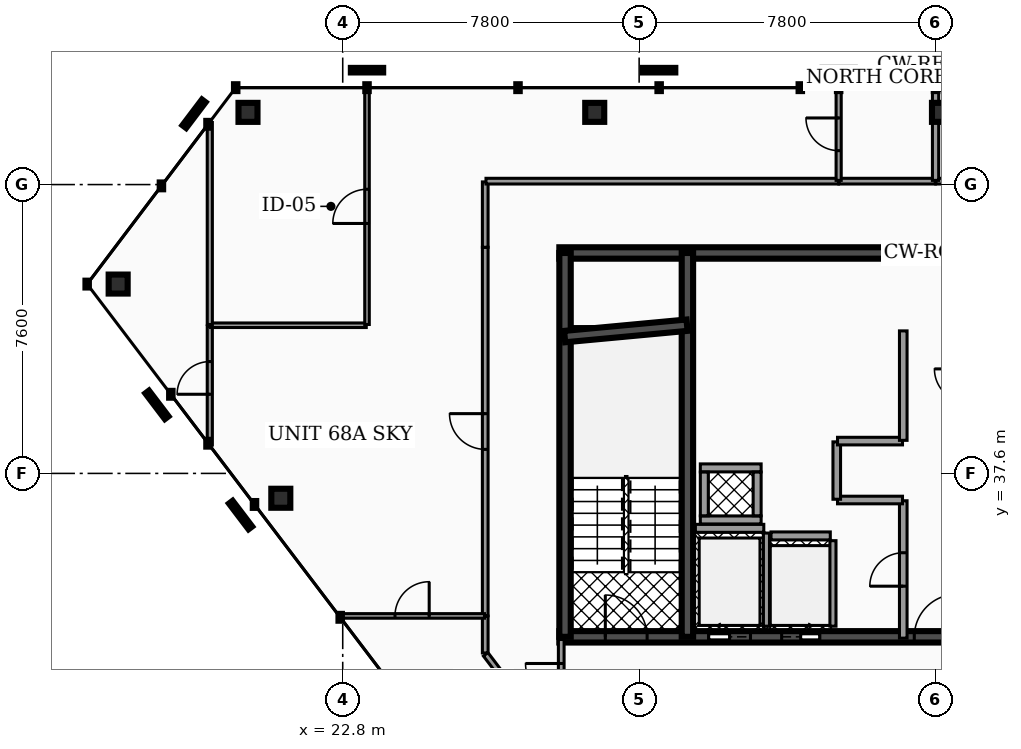
"""IFC4 building model, lengths in metres.
Left out: names, types, materials, properties, quantities, classifications, styles, units other than length and angle.
Written with IfcOpenShell. Run it as: python <this file> out.ifc"""

import sys

from ifc_helpers import new_model, si_unit, direction, frame, frame_2d, origin, origin_2d, place, context, subcontext, project, spatial, rectangle, hollow_rectangle, extrude, element, fill, save


model = new_model("IFC4")
c1 = context("Model", 3, precision=1e-05, world=origin(), true_north=direction((0.0, 1.0)))
c2 = subcontext(c1, "Body", "Model", "MODEL_VIEW")
j1 = project(units=[si_unit("LENGTHUNIT", "METRE"), si_unit("PLANEANGLEUNIT", "RADIAN")], contexts=[c1])
p1 = place(None, origin())
s1 = spatial("IfcSite", under=j1, at=p1, CompositionType="ELEMENT")
p2 = place(p1, origin())
s2 = spatial("IfcBuilding", under=s1, at=p2, CompositionType="ELEMENT")
p3 = place(p2, frame((0.0, 0.0, 268.6)))
s3 = spatial("IfcBuildingStorey", under=s2, at=p3, CompositionType="ELEMENT", Elevation=268.6)
p4 = place(p3, frame((28.5, 43.4, 0.0), z_axis=(0.0, 0.0, 1.0), x_axis=(1.0, 0.0, 0.0)))
e1 = element("IfcWall", 1, at=p4, inside=s3, PredefinedType="SHEAR", context=c2, shape_type="SweptSolid", body=[
    extrude(rectangle(XDim=19.86, YDim=0.3, at=frame_2d((9.93, 0.0))), origin(), (0.0, 0.0, 1.0), 3.18),
])
p5 = place(p3, frame((28.5, 33.3, 0.0), z_axis=(0.0, 0.0, 1.0), x_axis=(1.0, 0.0, 0.0)))
e2 = element("IfcWall", 2, at=p5, inside=s3, PredefinedType="SHEAR", context=c2, shape_type="SweptSolid", body=[
    extrude(rectangle(XDim=19.86, YDim=0.3, at=frame_2d((9.93, 0.0))), origin(), (0.0, 0.0, 1.0), 3.18),
])
p6 = place(p5, frame((3.93, 0.0, 0.0)))
e3 = element("IfcOpeningElement", 3, at=p6, cuts=e2, PredefinedType="OPENING", context=c2, shape_type="SweptSolid", body=[
    extrude(rectangle(XDim=1.1, YDim=2.15, at=frame_2d((0.55, 1.075))), frame((0.0, 0.16, 0.0), z_axis=(0.0, -1.0, 0.0), x_axis=(1.0, 0.0, 0.0)), (0.0, 0.0, 1.0), 0.32),
])
p7 = place(p5, frame((14.77, 0.0, 0.0)))
e4 = element("IfcOpeningElement", 4, at=p7, cuts=e2, PredefinedType="OPENING", context=c2, shape_type="SweptSolid", body=[
    extrude(rectangle(XDim=1.1, YDim=2.15, at=frame_2d((0.55, 1.075))), frame((0.0, 0.16, 0.0), z_axis=(0.0, -1.0, 0.0), x_axis=(1.0, 0.0, 0.0)), (0.0, 0.0, 1.0), 0.32),
])
p8 = place(p5, frame((11.25, 0.0, 0.0)))
e5 = element("IfcOpeningElement", 5, at=p8, cuts=e2, PredefinedType="OPENING", context=c2, shape_type="SweptSolid", body=[
    extrude(rectangle(XDim=1.0, YDim=2.1, at=frame_2d((0.5, 1.05))), frame((0.0, 0.16, 0.0), z_axis=(0.0, -1.0, 0.0), x_axis=(1.0, 0.0, 0.0)), (0.0, 0.0, 1.0), 0.32),
])
p9 = place(p5, frame((12.95, 0.0, 0.0)))
e6 = element("IfcOpeningElement", 6, at=p9, cuts=e2, PredefinedType="OPENING", context=c2, shape_type="SweptSolid", body=[
    extrude(rectangle(XDim=1.0, YDim=2.1, at=frame_2d((0.5, 1.05))), frame((0.0, 0.16, 0.0), z_axis=(0.0, -1.0, 0.0), x_axis=(1.0, 0.0, 0.0)), (0.0, 0.0, 1.0), 0.32),
])
p10 = place(p5, frame((5.85, 0.0, 0.0)))
e7 = element("IfcOpeningElement", 7, at=p10, cuts=e2, PredefinedType="OPENING", context=c2, shape_type="SweptSolid", body=[
    extrude(rectangle(XDim=1.0, YDim=2.1, at=frame_2d((0.5, 1.05))), frame((0.0, 0.16, 0.0), z_axis=(0.0, -1.0, 0.0), x_axis=(1.0, 0.0, 0.0)), (0.0, 0.0, 1.0), 0.32),
])
p11 = place(p5, frame((1.21, 0.0, 0.0)))
e8 = element("IfcOpeningElement", 8, at=p11, cuts=e2, PredefinedType="OPENING", context=c2, shape_type="SweptSolid", body=[
    extrude(rectangle(XDim=1.1, YDim=2.2, at=frame_2d((0.55, 1.1))), frame((0.0, 0.16, 0.0), z_axis=(0.0, -1.0, 0.0), x_axis=(1.0, 0.0, 0.0)), (0.0, 0.0, 1.0), 0.32),
])
p12 = place(p5, frame((9.34, 0.0, 0.0)))
e9 = element("IfcOpeningElement", 9, at=p12, cuts=e2, PredefinedType="OPENING", context=c2, shape_type="SweptSolid", body=[
    extrude(rectangle(XDim=1.12, YDim=2.05, at=frame_2d((0.56, 1.025))), frame((0.0, 0.16, 0.0), z_axis=(0.0, -1.0, 0.0), x_axis=(1.0, 0.0, 0.0)), (0.0, 0.0, 1.0), 0.32),
])
p13 = place(p5, frame((17.55, 0.0, 0.0)))
e10 = element("IfcOpeningElement", 10, at=p13, cuts=e2, PredefinedType="OPENING", context=c2, shape_type="SweptSolid", body=[
    extrude(rectangle(XDim=1.1, YDim=2.2, at=frame_2d((0.55, 1.1))), frame((0.0, 0.16, 0.0), z_axis=(0.0, -1.0, 0.0), x_axis=(1.0, 0.0, 0.0)), (0.0, 0.0, 1.0), 0.32),
])
for number, where, z_axis, x_axis in (
    (11, (28.65, 33.3, 0.0), (0.0, 0.0, 1.0), (0.0, 1.0, 0.0)),
    (12, (31.87, 33.3, 0.0), (0.0, 0.0, 1.0), (0.0, 1.0, 0.0)),
):
    element("IfcWall", number, at=place(p3, frame(where, z_axis=z_axis, x_axis=x_axis)), inside=s3, PredefinedType="SHEAR", context=c2, shape_type="SweptSolid", body=[
        extrude(rectangle(XDim=10.1, YDim=0.3, at=frame_2d((5.05, 0.0))), origin(), (0.0, 0.0, 1.0), 3.18),
    ])
p14 = place(p3, frame((28.64, 41.2, 0.0), z_axis=(0.0, 0.0, 1.0), x_axis=(0.995687118776, 0.092774789157, 0.0)))
e13 = element("IfcWall", 13, at=p14, inside=s3, PredefinedType="SHEAR", context=c2, shape_type="SweptSolid", body=[
    extrude(rectangle(XDim=3.234, YDim=0.3, at=frame_2d((1.617, 0.0))), origin(), (0.0, 0.0, 1.0), 3.18),
])
for number, where, z_axis, x_axis in (
    (14, (38.555, 47.1, 0.0), (0.0, 0.0, 1.0), (1.0, 0.0, 0.0)),
    (15, (29.431, 47.1, 0.0), (0.0, 0.0, 1.0), (1.0, 0.0, 0.0)),
    (16, (20.307, 47.1, 0.0), (0.0, 0.0, 1.0), (1.0, 0.0, 0.0)),
    (17, (16.891, 42.582, 0.0), (0.0, 0.0, 1.0), (1.0, 0.0, 0.0)),
    (18, (21.171, 36.946, 0.0), (0.0, 0.0, 1.0), (1.0, 0.0, 0.0)),
):
    element("IfcColumn", number, at=place(p3, frame(where, z_axis=z_axis, x_axis=x_axis)), inside=s3, PredefinedType="COLUMN", context=c2, shape_type="SweptSolid", body=[
        extrude(hollow_rectangle(XDim=0.5, YDim=0.5, WallThickness=0.025, at=origin_2d()), origin(), (0.0, 0.0, 1.0), 3.18),
    ])
p15 = place(p3, frame((32.08, 36.155, 0.0), z_axis=(0.0, 0.0, 1.0), x_axis=(1.0, 0.0, 0.0)))
e19 = element("IfcWall", 19, at=p15, inside=s3, PredefinedType="SOLIDWALL", context=c2, shape_type="SweptSolid", body=[
    extrude(rectangle(XDim=1.8, YDim=0.21, at=frame_2d((0.9, 0.0))), origin(), (0.0, 0.0, 1.0), 3.18),
])
p16 = place(p3, frame((33.95, 33.58, 0.0), z_axis=(0.0, 0.0, 1.0), x_axis=(0.0, 1.0, 0.0)))
e20 = element("IfcWall", 20, at=p16, inside=s3, PredefinedType="SOLIDWALL", context=c2, shape_type="SweptSolid", body=[
    extrude(rectangle(XDim=2.45, YDim=0.16, at=frame_2d((1.225, 0.0))), origin(), (0.0, 0.0, 1.0), 3.18),
])
p17 = place(p3, frame((34.07, 35.955, 0.0), z_axis=(0.0, 0.0, 1.0), x_axis=(1.0, 0.0, 0.0)))
e21 = element("IfcWall", 21, at=p17, inside=s3, PredefinedType="SOLIDWALL", context=c2, shape_type="SweptSolid", body=[
    extrude(rectangle(XDim=1.56, YDim=0.21, at=frame_2d((0.78, 0.0))), origin(), (0.0, 0.0, 1.0), 3.18),
])
p18 = place(p3, frame((35.7, 33.58, 0.0), z_axis=(0.0, 0.0, 1.0), x_axis=(0.0, 1.0, 0.0)))
e22 = element("IfcWall", 22, at=p18, inside=s3, PredefinedType="SOLIDWALL", context=c2, shape_type="SweptSolid", body=[
    extrude(rectangle(XDim=2.25, YDim=0.16, at=frame_2d((1.125, 0.0))), origin(), (0.0, 0.0, 1.0), 3.18),
])
for number, where, z_axis, x_axis in (
    (23, (32.21, 36.375, 0.0), (0.0, 0.0, 1.0), (1.0, 0.0, 0.0)),
    (24, (32.21, 37.745, 0.0), (0.0, 0.0, 1.0), (1.0, 0.0, 0.0)),
):
    element("IfcWall", number, at=place(p3, frame(where, z_axis=z_axis, x_axis=x_axis)), inside=s3, PredefinedType="SOLIDWALL", context=c2, shape_type="SweptSolid", body=[
        extrude(rectangle(XDim=1.6, YDim=0.21, at=frame_2d((0.8, 0.0))), origin(), (0.0, 0.0, 1.0), 3.18),
    ])
for number, where, z_axis, x_axis in (
    (25, (32.315, 36.485, 0.0), (0.0, 0.0, 1.0), (0.0, 1.0, 0.0)),
    (26, (33.705, 36.485, 0.0), (0.0, 0.0, 1.0), (0.0, 1.0, 0.0)),
):
    element("IfcWall", number, at=place(p3, frame(where, z_axis=z_axis, x_axis=x_axis)), inside=s3, PredefinedType="SOLIDWALL", context=c2, shape_type="SweptSolid", body=[
        extrude(rectangle(XDim=1.15, YDim=0.21, at=frame_2d((0.575, 0.0))), origin(), (0.0, 0.0, 1.0), 3.18),
    ])
p19 = place(p3, frame((37.55, 33.265, 0.0), z_axis=(0.0, 0.0, 1.0), x_axis=(0.0, 1.0, 0.0)))
e27 = element("IfcWall", 27, at=p19, inside=s3, PredefinedType="PARTITIONING", context=c2, shape_type="SweptSolid", body=[
    extrude(rectangle(XDim=3.615, YDim=0.2, at=frame_2d((1.808, 0.0))), origin(), (0.0, 0.0, 1.0), 2.235),
])
p20 = place(p19, frame((1.367, 0.0, 0.0)))
e28 = element("IfcOpeningElement", 28, at=p20, cuts=e27, PredefinedType="OPENING", context=c2, shape_type="SweptSolid", body=[
    extrude(rectangle(XDim=0.88, YDim=2.05, at=frame_2d((0.44, 1.025))), frame((0.0, 0.11, 0.0), z_axis=(0.0, -1.0, 0.0), x_axis=(1.0, 0.0, 0.0)), (0.0, 0.0, 1.0), 0.22),
])
p21 = place(p3, frame((35.82, 36.9, 0.0), z_axis=(0.0, 0.0, 1.0), x_axis=(1.0, 0.0, 0.0)))
e29 = element("IfcWall", 29, at=p21, inside=s3, PredefinedType="PARTITIONING", context=c2, shape_type="SweptSolid", body=[
    extrude(rectangle(XDim=1.71, YDim=0.2, at=frame_2d((0.855, 0.0))), origin(), (0.0, 0.0, 1.0), 2.235),
])
p22 = place(p3, frame((35.8, 36.92, 0.0), z_axis=(0.0, 0.0, 1.0), x_axis=(0.0, 1.0, 0.0)))
e30 = element("IfcWall", 30, at=p22, inside=s3, PredefinedType="PARTITIONING", context=c2, shape_type="SweptSolid", body=[
    extrude(rectangle(XDim=1.51, YDim=0.2, at=frame_2d((0.755, 0.0))), origin(), (0.0, 0.0, 1.0), 2.235),
])
p23 = place(p3, frame((35.82, 38.45, 0.0), z_axis=(0.0, 0.0, 1.0), x_axis=(1.0, 0.0, 0.0)))
e31 = element("IfcWall", 31, at=p23, inside=s3, PredefinedType="PARTITIONING", context=c2, shape_type="SweptSolid", body=[
    extrude(rectangle(XDim=1.71, YDim=0.2, at=frame_2d((0.855, 0.0))), origin(), (0.0, 0.0, 1.0), 2.235),
])
p24 = place(p3, frame((37.55, 38.47, 0.0), z_axis=(0.0, 0.0, 1.0), x_axis=(0.0, 1.0, 0.0)))
e32 = element("IfcWall", 32, at=p24, inside=s3, PredefinedType="PARTITIONING", context=c2, shape_type="SweptSolid", body=[
    extrude(rectangle(XDim=2.88, YDim=0.2, at=frame_2d((1.44, 0.0))), origin(), (0.0, 0.0, 1.0), 2.235),
])
p25 = place(p3, frame((28.55, 30.227, 0.0), z_axis=(0.0, 0.0, 1.0), x_axis=(0.0, 1.0, 0.0)))
e33 = element("IfcWall", 33, at=p25, inside=s3, PredefinedType="PARTITIONING", context=c2, shape_type="SweptSolid", body=[
    extrude(rectangle(XDim=3.003, YDim=0.15, at=frame_2d((1.501, 0.0))), origin(), (0.0, 0.0, 1.0), 2.235),
])
p26 = place(p25, frame((1.431, 0.0, 0.0)))
e34 = element("IfcOpeningElement", 34, at=p26, cuts=e33, PredefinedType="OPENING", context=c2, shape_type="SweptSolid", body=[
    extrude(rectangle(XDim=0.94, YDim=2.05, at=frame_2d((0.47, 1.025))), frame((0.0, 0.085, 0.0), z_axis=(0.0, -1.0, 0.0), x_axis=(1.0, 0.0, 0.0)), (0.0, 0.0, 1.0), 0.17),
])
p27 = place(p3, frame((26.55, 33.855, 0.0), z_axis=(0.0, 0.0, 1.0), x_axis=(0.0, 1.0, 0.0)))
e35 = element("IfcWall", 35, at=p27, inside=s3, PredefinedType="PARTITIONING", context=c2, shape_type="SweptSolid", body=[
    extrude(rectangle(XDim=9.695, YDim=0.15, at=frame_2d((4.847, 0.0))), origin(), (0.0, 0.0, 1.0), 2.235),
])
p28 = place(p27, frame((4.377, 0.0, 0.0)))
e36 = element("IfcOpeningElement", 36, at=p28, cuts=e35, PredefinedType="OPENING", context=c2, shape_type="SweptSolid", body=[
    extrude(rectangle(XDim=0.94, YDim=2.05, at=frame_2d((0.47, 1.025))), frame((0.0, 0.085, 0.0), z_axis=(0.0, -1.0, 0.0), x_axis=(1.0, 0.0, 0.0)), (0.0, 0.0, 1.0), 0.17),
])
p29 = place(p3, frame((26.55, 43.55, 0.0), z_axis=(0.0, 0.0, 1.0), x_axis=(0.0, 1.0, 0.0)))
e37 = element("IfcWall", 37, at=p29, inside=s3, PredefinedType="PARTITIONING", context=c2, shape_type="SweptSolid", body=[
    extrude(rectangle(XDim=1.72, YDim=0.15, at=frame_2d((0.86, 0.0))), origin(), (0.0, 0.0, 1.0), 2.235),
])
p30 = place(p3, frame((26.57, 45.29, 0.0), z_axis=(0.0, 0.0, 1.0), x_axis=(1.0, 0.0, 0.0)))
e38 = element("IfcWall", 38, at=p30, inside=s3, PredefinedType="PARTITIONING", context=c2, shape_type="SweptSolid", body=[
    extrude(rectangle(XDim=9.275, YDim=0.15, at=frame_2d((4.637, 0.0))), origin(), (0.0, 0.0, 1.0), 2.235),
])
p31 = place(p3, frame((35.855, 45.29, 0.0), z_axis=(0.0, 0.0, 1.0), x_axis=(1.0, 0.0, 0.0)))
e39 = element("IfcWall", 39, at=p31, inside=s3, PredefinedType="PARTITIONING", context=c2, shape_type="SweptSolid", body=[
    extrude(rectangle(XDim=2.54, YDim=0.15, at=frame_2d((1.27, 0.0))), origin(), (0.0, 0.0, 1.0), 2.235),
])
p32 = place(p3, frame((26.562, 32.84, 0.0), z_axis=(0.0, 0.0, 1.0), x_axis=(0.604783852999, -0.796389660375, 0.0)))
e40 = element("IfcWall", 40, at=p32, inside=s3, PredefinedType="PARTITIONING", context=c2, shape_type="SweptSolid", body=[
    extrude(rectangle(XDim=3.267, YDim=0.15, at=frame_2d((1.634, 0.0))), origin(), (0.0, 0.0, 1.0), 2.235),
])
p33 = place(p3, frame((26.55, 32.875, 0.0), z_axis=(0.0, 0.0, 1.0), x_axis=(0.0, 1.0, 0.0)))
e41 = element("IfcWall", 41, at=p33, inside=s3, PredefinedType="PARTITIONING", context=c2, shape_type="SweptSolid", body=[
    extrude(rectangle(XDim=0.97, YDim=0.15, at=frame_2d((0.485, 0.0))), origin(), (0.0, 0.0, 1.0), 2.235),
])
p34 = place(p3, frame((38.405, 45.29, 0.0), z_axis=(0.0, 0.0, 1.0), x_axis=(1.0, 0.0, 0.0)))
e42 = element("IfcWall", 42, at=p34, inside=s3, PredefinedType="PARTITIONING", context=c2, shape_type="SweptSolid", body=[
    extrude(rectangle(XDim=2.54, YDim=0.15, at=frame_2d((1.27, 0.0))), origin(), (0.0, 0.0, 1.0), 2.235),
])
p35 = place(p3, frame((19.302, 38.347, 0.0), z_axis=(0.0, 0.0, 1.0), x_axis=(0.0, 1.0, 0.0)))
e43 = element("IfcWall", 43, at=p35, inside=s3, PredefinedType="PARTITIONING", context=c2, shape_type="SweptSolid", body=[
    extrude(rectangle(XDim=3.132, YDim=0.135, at=frame_2d((1.566, 0.0))), origin(), (0.0, 0.0, 1.0), 2.235),
])
p36 = place(p35, frame((1.336, 0.0, 0.0)))
e44 = element("IfcOpeningElement", 44, at=p36, cuts=e43, PredefinedType="OPENING", context=c2, shape_type="SweptSolid", body=[
    extrude(rectangle(XDim=0.86, YDim=2.05, at=frame_2d((0.43, 1.025))), frame((0.0, 0.077, 0.0), z_axis=(0.0, -1.0, 0.0), x_axis=(1.0, 0.0, 0.0)), (0.0, 0.0, 1.0), 0.155),
])
p37 = place(p3, frame((35.85, 45.31, 0.0), z_axis=(0.0, 0.0, 1.0), x_axis=(0.0, 1.0, 0.0)))
e45 = element("IfcWall", 45, at=p37, inside=s3, PredefinedType="PARTITIONING", context=c2, shape_type="SweptSolid", body=[
    extrude(rectangle(XDim=2.425, YDim=0.135, at=frame_2d((1.212, 0.0))), origin(), (0.0, 0.0, 1.0), 2.235),
])
p38 = place(p37, frame((0.782, 0.0, 0.0)))
e46 = element("IfcOpeningElement", 46, at=p38, cuts=e45, PredefinedType="OPENING", context=c2, shape_type="SweptSolid", body=[
    extrude(rectangle(XDim=0.86, YDim=2.05, at=frame_2d((0.43, 1.025))), frame((0.0, 0.077, 0.0), z_axis=(0.0, -1.0, 0.0), x_axis=(1.0, 0.0, 0.0)), (0.0, 0.0, 1.0), 0.155),
])
p39 = place(p3, frame((19.322, 41.499, 0.0), z_axis=(0.0, 0.0, 1.0), x_axis=(1.0, 0.0, 0.0)))
e47 = element("IfcWall", 47, at=p39, inside=s3, PredefinedType="PARTITIONING", context=c2, shape_type="SweptSolid", body=[
    extrude(rectangle(XDim=4.097, YDim=0.12, at=frame_2d((2.048, 0.0))), origin(), (0.0, 0.0, 1.0), 2.235),
])
p40 = place(p3, frame((23.439, 41.519, 0.0), z_axis=(0.0, 0.0, 1.0), x_axis=(0.0, 1.0, 0.0)))
e48 = element("IfcWall", 48, at=p40, inside=s3, PredefinedType="PARTITIONING", context=c2, shape_type="SweptSolid", body=[
    extrude(rectangle(XDim=6.217, YDim=0.12, at=frame_2d((3.108, 0.0))), origin(), (0.0, 0.0, 1.0), 2.235),
])
p41 = place(p40, frame((2.658, 0.0, 0.0)))
e49 = element("IfcOpeningElement", 49, at=p41, cuts=e48, PredefinedType="OPENING", context=c2, shape_type="SweptSolid", body=[
    extrude(rectangle(XDim=0.9, YDim=2.05, at=frame_2d((0.45, 1.025))), frame((0.0, 0.07, 0.0), z_axis=(0.0, -1.0, 0.0), x_axis=(1.0, 0.0, 0.0)), (0.0, 0.0, 1.0), 0.14),
])
p42 = place(p3, frame((22.721, 33.85, 0.0), z_axis=(0.0, 0.0, 1.0), x_axis=(1.0, 0.0, 0.0)))
e50 = element("IfcWall", 50, at=p42, inside=s3, PredefinedType="PARTITIONING", context=c2, shape_type="SweptSolid", body=[
    extrude(rectangle(XDim=3.809, YDim=0.12, at=frame_2d((1.905, 0.0))), origin(), (0.0, 0.0, 1.0), 2.235),
])
p43 = place(p42, frame((1.455, 0.0, 0.0)))
e51 = element("IfcOpeningElement", 51, at=p43, cuts=e50, PredefinedType="OPENING", context=c2, shape_type="SweptSolid", body=[
    extrude(rectangle(XDim=0.9, YDim=2.05, at=frame_2d((0.45, 1.025))), frame((0.0, 0.07, 0.0), z_axis=(0.0, -1.0, 0.0), x_axis=(1.0, 0.0, 0.0)), (0.0, 0.0, 1.0), 0.14),
])
p44 = place(p3, frame((19.302, 41.519, 0.0), z_axis=(0.0, 0.0, 1.0), x_axis=(0.0, 1.0, 0.0)))
e52 = element("IfcWall", 52, at=p44, inside=s3, PredefinedType="PARTITIONING", context=c2, shape_type="SweptSolid", body=[
    extrude(rectangle(XDim=5.315, YDim=0.135, at=frame_2d((2.658, 0.0))), origin(), (0.0, 0.0, 1.0), 2.235),
])
p45 = place(p3, frame((38.4, 45.31, 0.0), z_axis=(0.0, 0.0, 1.0), x_axis=(0.0, 1.0, 0.0)))
e53 = element("IfcWall", 53, at=p45, inside=s3, PredefinedType="PARTITIONING", context=c2, shape_type="SweptSolid", body=[
    extrude(rectangle(XDim=2.425, YDim=0.165, at=frame_2d((1.212, 0.0))), origin(), (0.0, 0.0, 1.0), 2.235),
])
p46 = place(p6, origin())
e54 = element("IfcDoor", 54, at=p46, inside=s3, OperationType="SLIDING_TO_LEFT", PredefinedType="DOOR", context=c2, shape_type="SweptSolid", body=[
    extrude(rectangle(XDim=1.1, YDim=2.15, at=frame_2d((0.55, 1.075))), frame((0.0, 0.025, 0.0), z_axis=(0.0, -1.0, 0.0), x_axis=(1.0, 0.0, 0.0)), (0.0, 0.0, 1.0), 0.05),
])
fill(e3, e54)
p47 = place(p10, origin())
e55 = element("IfcDoor", 55, at=p47, inside=s3, OperationType="SLIDING_TO_RIGHT", PredefinedType="DOOR", context=c2, shape_type="SweptSolid", body=[
    extrude(rectangle(XDim=1.0, YDim=2.1, at=frame_2d((0.5, 1.05))), frame((0.0, 0.025, 0.0), z_axis=(0.0, -1.0, 0.0), x_axis=(1.0, 0.0, 0.0)), (0.0, 0.0, 1.0), 0.05),
])
fill(e7, e55)
p48 = place(p11, origin())
e56 = element("IfcDoor", 56, at=p48, inside=s3, OperationType="SINGLE_SWING_LEFT", PredefinedType="DOOR", context=c2, shape_type="SweptSolid", body=[
    extrude(rectangle(XDim=1.1, YDim=2.2, at=frame_2d((0.55, 1.1))), frame((0.0, 0.025, 0.0), z_axis=(0.0, -1.0, 0.0), x_axis=(1.0, 0.0, 0.0)), (0.0, 0.0, 1.0), 0.05),
])
fill(e8, e56)
p49 = place(p12, origin())
e57 = element("IfcDoor", 57, at=p49, inside=s3, OperationType="SINGLE_SWING_RIGHT", PredefinedType="DOOR", context=c2, shape_type="SweptSolid", body=[
    extrude(rectangle(XDim=1.12, YDim=2.05, at=frame_2d((0.56, 1.025))), frame((0.0, 0.025, 0.0), z_axis=(0.0, -1.0, 0.0), x_axis=(1.0, 0.0, 0.0)), (0.0, 0.0, 1.0), 0.05),
])
fill(e9, e57)
p50 = place(p20, origin())
e58 = element("IfcDoor", 58, at=p50, inside=s3, OperationType="SINGLE_SWING_LEFT", PredefinedType="DOOR", context=c2, shape_type="SweptSolid", body=[
    extrude(rectangle(XDim=0.88, YDim=2.05, at=frame_2d((0.44, 1.025))), frame((0.0, 0.025, 0.0), z_axis=(0.0, -1.0, 0.0), x_axis=(1.0, 0.0, 0.0)), (0.0, 0.0, 1.0), 0.05),
])
fill(e28, e58)
p51 = place(p26, origin())
e59 = element("IfcDoor", 59, at=p51, inside=s3, OperationType="SINGLE_SWING_RIGHT", PredefinedType="DOOR", context=c2, shape_type="SweptSolid", body=[
    extrude(rectangle(XDim=0.94, YDim=2.05, at=frame_2d((0.47, 1.025))), frame((0.0, 0.025, 0.0), z_axis=(0.0, -1.0, 0.0), x_axis=(1.0, 0.0, 0.0)), (0.0, 0.0, 1.0), 0.05),
])
fill(e34, e59)
p52 = place(p28, origin())
e60 = element("IfcDoor", 60, at=p52, inside=s3, OperationType="SINGLE_SWING_RIGHT", PredefinedType="DOOR", context=c2, shape_type="SweptSolid", body=[
    extrude(rectangle(XDim=0.94, YDim=2.05, at=frame_2d((0.47, 1.025))), frame((0.0, 0.025, 0.0), z_axis=(0.0, -1.0, 0.0), x_axis=(1.0, 0.0, 0.0)), (0.0, 0.0, 1.0), 0.05),
])
fill(e36, e60)
p53 = place(p36, origin())
e61 = element("IfcDoor", 61, at=p53, inside=s3, OperationType="SINGLE_SWING_LEFT", PredefinedType="DOOR", context=c2, shape_type="SweptSolid", body=[
    extrude(rectangle(XDim=0.86, YDim=2.05, at=frame_2d((0.43, 1.025))), frame((0.0, 0.025, 0.0), z_axis=(0.0, -1.0, 0.0), x_axis=(1.0, 0.0, 0.0)), (0.0, 0.0, 1.0), 0.05),
])
fill(e44, e61)
p54 = place(p38, origin())
e62 = element("IfcDoor", 62, at=p54, inside=s3, OperationType="SINGLE_SWING_RIGHT", PredefinedType="DOOR", context=c2, shape_type="SweptSolid", body=[
    extrude(rectangle(XDim=0.86, YDim=2.05, at=frame_2d((0.43, 1.025))), frame((0.0, 0.025, 0.0), z_axis=(0.0, -1.0, 0.0), x_axis=(1.0, 0.0, 0.0)), (0.0, 0.0, 1.0), 0.05),
])
fill(e46, e62)
p55 = place(p41, origin())
e63 = element("IfcDoor", 63, at=p55, inside=s3, OperationType="SINGLE_SWING_LEFT", PredefinedType="DOOR", context=c2, shape_type="SweptSolid", body=[
    extrude(rectangle(XDim=0.9, YDim=2.05, at=frame_2d((0.45, 1.025))), frame((0.0, 0.025, 0.0), z_axis=(0.0, -1.0, 0.0), x_axis=(1.0, 0.0, 0.0)), (0.0, 0.0, 1.0), 0.05),
])
fill(e49, e63)
p56 = place(p43, origin())
e64 = element("IfcDoor", 64, at=p56, inside=s3, OperationType="SINGLE_SWING_RIGHT", PredefinedType="DOOR", context=c2, shape_type="SweptSolid", body=[
    extrude(rectangle(XDim=0.9, YDim=2.05, at=frame_2d((0.45, 1.025))), frame((0.0, 0.025, 0.0), z_axis=(0.0, -1.0, 0.0), x_axis=(1.0, 0.0, 0.0)), (0.0, 0.0, 1.0), 0.05),
])
fill(e51, e64)
save(model, sys.argv[1])
